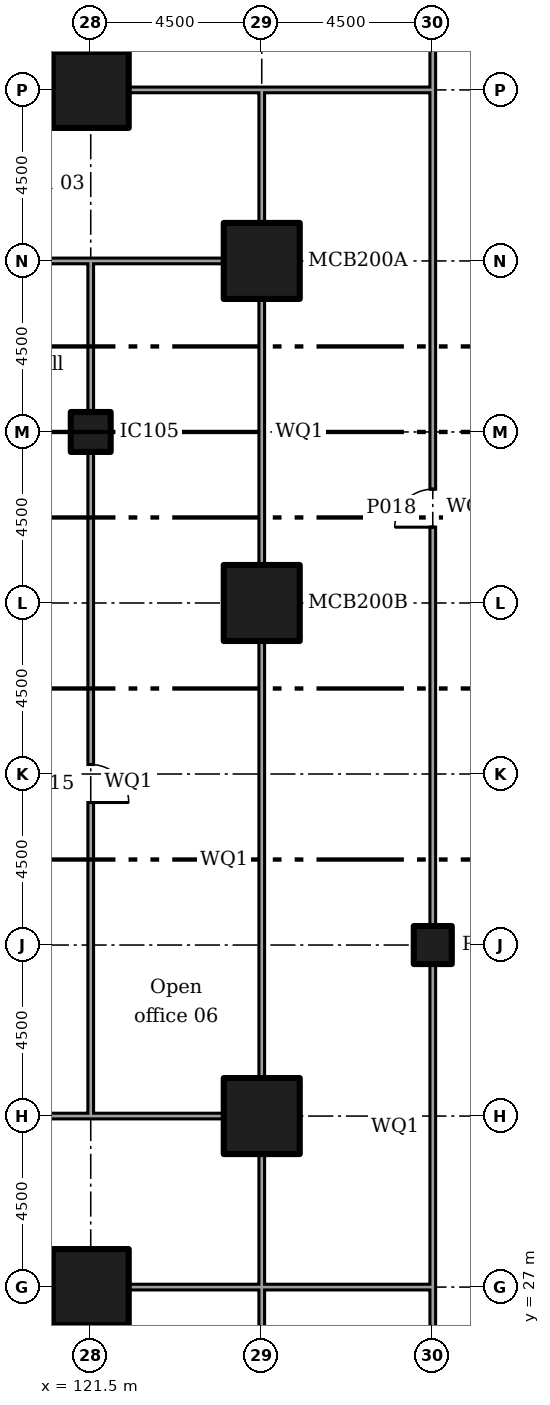
"""IFC4 building model, lengths in metres.
Left out: names, types, materials, properties, quantities, classifications, styles, units other than length and angle.
Written with IfcOpenShell. Run it as: python <this file> out.ifc"""

import sys

from ifc_helpers import new_model, si_unit, direction, frame, frame_2d, origin, origin_2d, place, context, subcontext, project, spatial, rectangle, extrude, element, fill, save


model = new_model("IFC4")
c1 = context("Model", 3, precision=1e-05, world=origin(), true_north=direction((0.0, 1.0)))
c2 = subcontext(c1, "Body", "Model", "MODEL_VIEW")
j1 = project(units=[si_unit("LENGTHUNIT", "METRE"), si_unit("PLANEANGLEUNIT", "RADIAN")], contexts=[c1])
p1 = place(None, origin())
s1 = spatial("IfcSite", under=j1, at=p1, CompositionType="ELEMENT")
p2 = place(p1, origin())
s2 = spatial("IfcBuilding", under=s1, at=p2, CompositionType="ELEMENT")
p3 = place(p2, frame((0.0, 0.0, 11.5)))
s3 = spatial("IfcBuildingStorey", under=s2, at=p3, CompositionType="ELEMENT", Elevation=11.5)
for number, where in (
    (1, (121.5, 27.0, 0.0)),
    (2, (121.5, 58.5, 0.0)),
    (3, (126.0, 31.5, 0.0)),
    (4, (126.0, 45.0, 0.0)),
    (5, (126.0, 54.0, 0.0)),
):
    element("IfcColumn", number, at=place(p3, frame(where)), inside=s3, PredefinedType="COLUMN", context=c2, shape_type="SweptSolid", body=[
        extrude(rectangle(XDim=2.0, YDim=2.0, at=origin_2d()), origin(), (0.0, 0.0, 1.0), 5.0),
    ])
p4 = place(p3, frame((121.5, 49.5, 0.0)))
e6 = element("IfcColumn", 6, at=p4, inside=s3, PredefinedType="COLUMN", context=c2, shape_type="SweptSolid", body=[
    extrude(rectangle(XDim=1.05, YDim=1.05, at=origin_2d()), origin(), (0.0, 0.0, 1.0), 5.0),
])
p5 = place(p3, frame((130.5, 36.0, 0.0)))
e7 = element("IfcColumn", 7, at=p5, inside=s3, PredefinedType="COLUMN", context=c2, shape_type="SweptSolid", body=[
    extrude(rectangle(XDim=1.0, YDim=1.0, at=origin_2d()), origin(), (0.0, 0.0, 1.0), 5.0),
])
p6 = place(p3, frame((130.5, 26.925, 0.0), z_axis=(0.0, 0.0, 1.0), x_axis=(0.0, 1.0, 0.0)))
e8 = element("IfcWall", 8, at=p6, inside=s3, PredefinedType="PARTITIONING", context=c2, shape_type="SweptSolid", body=[
    extrude(rectangle(XDim=8.58, YDim=0.15, at=frame_2d((4.29, 0.0))), origin(), (0.0, 0.0, 1.0), 4.55),
])
p7 = place(p3, frame((130.5, 36.495, 0.0), z_axis=(0.0, 0.0, 1.0), x_axis=(0.0, 1.0, 0.0)))
e9 = element("IfcWall", 9, at=p7, inside=s3, PredefinedType="PARTITIONING", context=c2, shape_type="SweptSolid", body=[
    extrude(rectangle(XDim=22.08, YDim=0.15, at=frame_2d((11.04, 0.0))), origin(), (0.0, 0.0, 1.0), 4.55),
])
p8 = place(p7, frame((10.5, 0.0, 0.0)))
e10 = element("IfcOpeningElement", 10, at=p8, cuts=e9, PredefinedType="OPENING", context=c2, shape_type="SweptSolid", body=[
    extrude(rectangle(XDim=1.0, YDim=2.1, at=frame_2d((0.5, 1.05))), frame((0.0, 0.085, 0.0), z_axis=(0.0, -1.0, 0.0), x_axis=(1.0, 0.0, 0.0)), (0.0, 0.0, 1.0), 0.17),
])
p9 = place(p3, frame((130.5, 58.5, 0.0), z_axis=(0.0, 0.0, 1.0), x_axis=(0.0, 1.0, 0.0)))
e11 = element("IfcWall", 11, at=p9, inside=s3, PredefinedType="PARTITIONING", context=c2, shape_type="SweptSolid", body=[
    extrude(rectangle(XDim=17.505, YDim=0.15, at=frame_2d((8.752, 0.0))), origin(), (0.0, 0.0, 1.0), 4.55),
])
p10 = place(p9, frame((7.85, 0.0, 0.0)))
e12 = element("IfcOpeningElement", 12, at=p10, cuts=e11, PredefinedType="OPENING", context=c2, shape_type="SweptSolid", body=[
    extrude(rectangle(XDim=1.8, YDim=2.1, at=frame_2d((0.9, 1.05))), frame((0.0, 0.085, 0.0), z_axis=(0.0, -1.0, 0.0), x_axis=(1.0, 0.0, 0.0)), (0.0, 0.0, 1.0), 0.17),
])
p11 = place(p3, frame((130.5, 22.5, 0.0), z_axis=(0.0, 0.0, 1.0), x_axis=(0.0, 1.0, 0.0)))
e13 = element("IfcWall", 13, at=p11, inside=s3, PredefinedType="PARTITIONING", context=c2, shape_type="SweptSolid", body=[
    extrude(rectangle(XDim=4.5, YDim=0.15, at=frame_2d((2.25, 0.0))), origin(), (0.0, 0.0, 1.0), 4.55),
])
p12 = place(p11, frame((1.75, 0.0, 0.0)))
e14 = element("IfcOpeningElement", 14, at=p12, cuts=e13, PredefinedType="OPENING", context=c2, shape_type="SweptSolid", body=[
    extrude(rectangle(XDim=1.0, YDim=2.1, at=frame_2d((0.5, 1.05))), frame((0.0, 0.085, 0.0), z_axis=(0.0, -1.0, 0.0), x_axis=(1.0, 0.0, 0.0)), (0.0, 0.0, 1.0), 0.17),
])
p13 = place(p3, frame((117.52, 31.5, 0.0)))
e15 = element("IfcWall", 15, at=p13, inside=s3, PredefinedType="PARTITIONING", context=c2, shape_type="SweptSolid", body=[
    extrude(rectangle(XDim=4.055, YDim=0.15, at=frame_2d((2.027, 0.0))), origin(), (0.0, 0.0, 1.0), 4.55),
])
p14 = place(p3, frame((104.02, 54.0, 0.0)))
e16 = element("IfcWall", 16, at=p14, inside=s3, PredefinedType="PARTITIONING", context=c2, shape_type="SweptSolid", body=[
    extrude(rectangle(XDim=17.555, YDim=0.15, at=frame_2d((8.777, 0.0))), origin(), (0.0, 0.0, 1.0), 4.55),
])
p15 = place(p14, frame((8.25, 0.0, 0.0)))
e17 = element("IfcOpeningElement", 17, at=p15, cuts=e16, PredefinedType="OPENING", context=c2, shape_type="SweptSolid", body=[
    extrude(rectangle(XDim=1.0, YDim=2.1, at=frame_2d((0.5, 1.05))), frame((0.0, 0.085, 0.0), z_axis=(0.0, -1.0, 0.0), x_axis=(1.0, 0.0, 0.0)), (0.0, 0.0, 1.0), 0.17),
])
p16 = place(p3, frame((121.5, 31.575, 0.0), z_axis=(0.0, 0.0, 1.0), x_axis=(0.0, 1.0, 0.0)))
e18 = element("IfcWall", 18, at=p16, inside=s3, PredefinedType="PARTITIONING", context=c2, shape_type="SweptSolid", body=[
    extrude(rectangle(XDim=17.405, YDim=0.15, at=frame_2d((8.703, 0.0))), origin(), (0.0, 0.0, 1.0), 4.55),
])
p17 = place(p16, frame((8.175, 0.0, 0.0)))
e19 = element("IfcOpeningElement", 19, at=p17, cuts=e18, PredefinedType="OPENING", context=c2, shape_type="SweptSolid", body=[
    extrude(rectangle(XDim=1.0, YDim=2.1, at=frame_2d((0.5, 1.05))), frame((0.0, 0.085, 0.0), z_axis=(0.0, -1.0, 0.0), x_axis=(1.0, 0.0, 0.0)), (0.0, 0.0, 1.0), 0.17),
])
p18 = place(p3, frame((121.5, 50.02, 0.0), z_axis=(0.0, 0.0, 1.0), x_axis=(0.0, 1.0, 0.0)))
e20 = element("IfcWall", 20, at=p18, inside=s3, PredefinedType="PARTITIONING", context=c2, shape_type="SweptSolid", body=[
    extrude(rectangle(XDim=3.905, YDim=0.15, at=frame_2d((1.953, 0.0))), origin(), (0.0, 0.0, 1.0), 4.55),
])
p19 = place(p3, frame((121.5, 31.5, 0.0)))
e21 = element("IfcWall", 21, at=p19, inside=s3, PredefinedType="PARTITIONING", context=c2, shape_type="SweptSolid", body=[
    extrude(rectangle(XDim=3.505, YDim=0.15, at=frame_2d((1.752, 0.0))), origin(), (0.0, 0.0, 1.0), 4.55),
])
p20 = place(p3, frame((113.495, 27.0, 0.0)))
e22 = element("IfcWall", 22, at=p20, inside=s3, PredefinedType="PARTITIONING", context=c2, shape_type="SweptSolid", body=[
    extrude(rectangle(XDim=7.01, YDim=0.15, at=frame_2d((3.505, 0.0))), origin(), (0.0, 0.0, 1.0), 4.55),
])
p21 = place(p3, frame((122.495, 27.0, 0.0)))
e23 = element("IfcWall", 23, at=p21, inside=s3, PredefinedType="PARTITIONING", context=c2, shape_type="SweptSolid", body=[
    extrude(rectangle(XDim=3.58, YDim=0.15, at=frame_2d((1.79, 0.0))), origin(), (0.0, 0.0, 1.0), 4.55),
])
p22 = place(p3, frame((126.0, 26.925, 0.0), z_axis=(0.0, 0.0, 1.0), x_axis=(0.0, 1.0, 0.0)))
e24 = element("IfcWall", 24, at=p22, inside=s3, PredefinedType="PARTITIONING", context=c2, shape_type="SweptSolid", body=[
    extrude(rectangle(XDim=3.58, YDim=0.15, at=frame_2d((1.79, 0.0))), origin(), (0.0, 0.0, 1.0), 4.55),
])
p23 = place(p3, frame((121.5, 54.0, 0.0)))
e25 = element("IfcWall", 25, at=p23, inside=s3, PredefinedType="PARTITIONING", context=c2, shape_type="SweptSolid", body=[
    extrude(rectangle(XDim=3.505, YDim=0.15, at=frame_2d((1.752, 0.0))), origin(), (0.0, 0.0, 1.0), 4.55),
])
p24 = place(p3, frame((126.0, 54.995, 0.0), z_axis=(0.0, 0.0, 1.0), x_axis=(0.0, 1.0, 0.0)))
e26 = element("IfcWall", 26, at=p24, inside=s3, PredefinedType="PARTITIONING", context=c2, shape_type="SweptSolid", body=[
    extrude(rectangle(XDim=3.58, YDim=0.15, at=frame_2d((1.79, 0.0))), origin(), (0.0, 0.0, 1.0), 4.55),
])
p25 = place(p3, frame((113.495, 58.5, 0.0)))
e27 = element("IfcWall", 27, at=p25, inside=s3, PredefinedType="PARTITIONING", context=c2, shape_type="SweptSolid", body=[
    extrude(rectangle(XDim=7.01, YDim=0.15, at=frame_2d((3.505, 0.0))), origin(), (0.0, 0.0, 1.0), 4.55),
])
p26 = place(p3, frame((122.495, 58.5, 0.0)))
e28 = element("IfcWall", 28, at=p26, inside=s3, PredefinedType="PARTITIONING", context=c2, shape_type="SweptSolid", body=[
    extrude(rectangle(XDim=3.505, YDim=0.15, at=frame_2d((1.752, 0.0))), origin(), (0.0, 0.0, 1.0), 4.55),
])
p27 = place(p3, frame((126.0, 32.495, 0.0), z_axis=(0.0, 0.0, 1.0), x_axis=(0.0, 1.0, 0.0)))
e29 = element("IfcWall", 29, at=p27, inside=s3, PredefinedType="PARTITIONING", context=c2, shape_type="SweptSolid", body=[
    extrude(rectangle(XDim=11.51, YDim=0.15, at=frame_2d((5.755, 0.0))), origin(), (0.0, 0.0, 1.0), 4.55),
])
p28 = place(p3, frame((126.0, 45.995, 0.0), z_axis=(0.0, 0.0, 1.0), x_axis=(0.0, 1.0, 0.0)))
e30 = element("IfcWall", 30, at=p28, inside=s3, PredefinedType="PARTITIONING", context=c2, shape_type="SweptSolid", body=[
    extrude(rectangle(XDim=7.01, YDim=0.15, at=frame_2d((3.505, 0.0))), origin(), (0.0, 0.0, 1.0), 4.55),
])
p29 = place(p3, frame((126.0, 22.575, 0.0), z_axis=(0.0, 0.0, 1.0), x_axis=(0.0, 1.0, 0.0)))
e31 = element("IfcWall", 31, at=p29, inside=s3, PredefinedType="PARTITIONING", context=c2, shape_type="SweptSolid", body=[
    extrude(rectangle(XDim=4.35, YDim=0.15, at=frame_2d((2.175, 0.0))), origin(), (0.0, 0.0, 1.0), 4.55),
])
for number, where in (
    (32, (126.075, 58.5, 0.0)),
    (33, (126.075, 27.0, 0.0)),
):
    element("IfcWall", number, at=place(p3, frame(where)), inside=s3, PredefinedType="PARTITIONING", context=c2, shape_type="SweptSolid", body=[
        extrude(rectangle(XDim=4.35, YDim=0.15, at=frame_2d((2.175, 0.0))), origin(), (0.0, 0.0, 1.0), 4.55),
    ])
p30 = place(p17, frame((1.0, 0.0, 0.0), x_axis=(-1.0, 0.0, 0.0)))
e34 = element("IfcDoor", 34, at=p30, inside=s3, OperationType="SINGLE_SWING_LEFT", PredefinedType="DOOR", context=c2, shape_type="SweptSolid", body=[
    extrude(rectangle(XDim=1.0, YDim=2.1, at=frame_2d((0.5, 1.05))), frame((0.0, 0.025, 0.0), z_axis=(0.0, -1.0, 0.0), x_axis=(1.0, 0.0, 0.0)), (0.0, 0.0, 1.0), 0.05),
])
fill(e19, e34)
p31 = place(p8, origin())
e35 = element("IfcDoor", 35, at=p31, inside=s3, OperationType="SINGLE_SWING_RIGHT", PredefinedType="DOOR", context=c2, shape_type="SweptSolid", body=[
    extrude(rectangle(XDim=1.0, YDim=2.1, at=frame_2d((0.5, 1.05))), frame((0.0, 0.025, 0.0), z_axis=(0.0, -1.0, 0.0), x_axis=(1.0, 0.0, 0.0)), (0.0, 0.0, 1.0), 0.05),
])
fill(e10, e35)
save(model, sys.argv[1])
